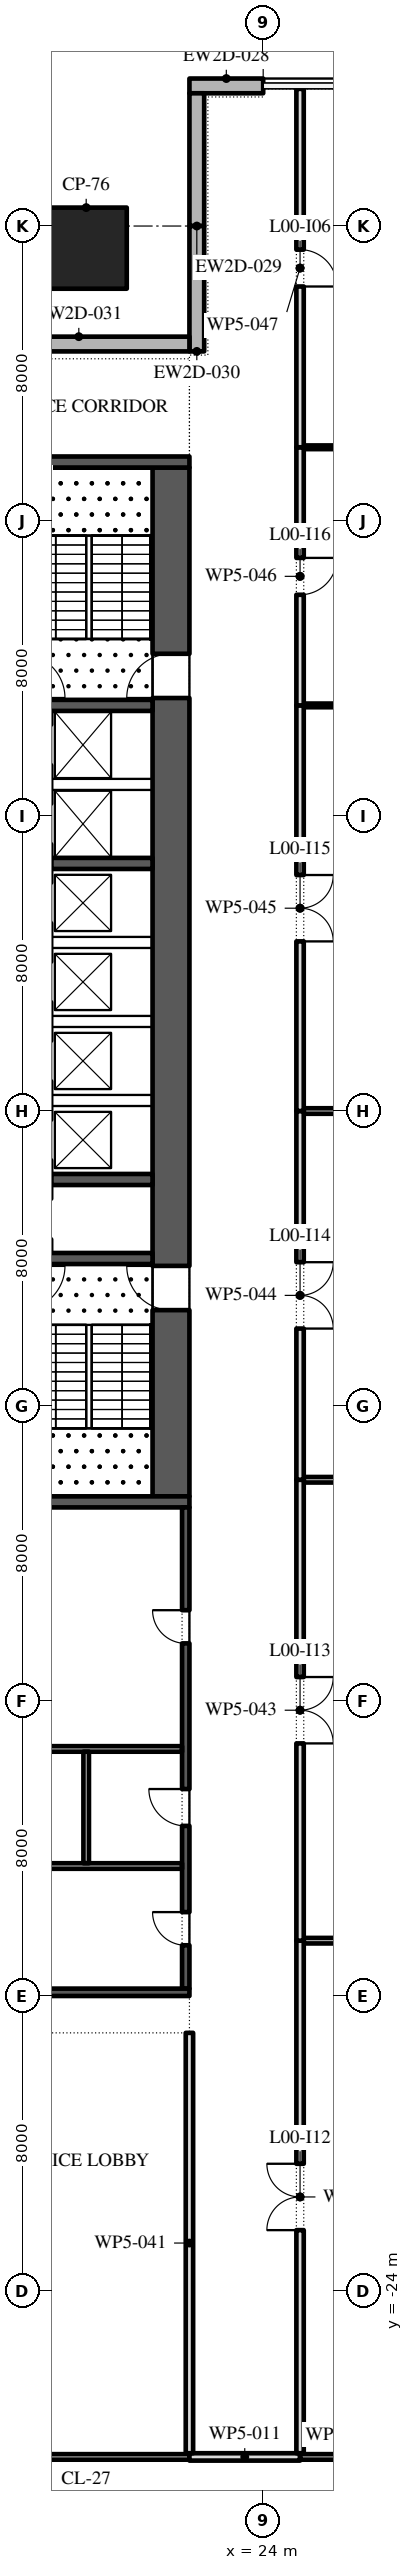
"""IFC4 building model, lengths in metres.
Left out: names, types, materials, properties, quantities, classifications, styles, units other than length and angle.
Written with IfcOpenShell. Run it as: python <this file> out.ifc"""

import sys

from ifc_helpers import new_model, si_unit, direction, frame, frame_2d, origin, origin_2d, place, context, subcontext, project, spatial, rectangle, extrude, element, fill, save


model = new_model("IFC4")
c1 = context("Model", 3, precision=1e-05, world=origin(), true_north=direction((0.0, 1.0)))
c2 = subcontext(c1, "Body", "Model", "MODEL_VIEW")
j1 = project(units=[si_unit("LENGTHUNIT", "METRE"), si_unit("PLANEANGLEUNIT", "RADIAN")], contexts=[c1])
p1 = place(None, origin())
s1 = spatial("IfcSite", under=j1, at=p1, CompositionType="ELEMENT")
p2 = place(p1, origin())
s2 = spatial("IfcBuilding", under=s1, at=p2, CompositionType="ELEMENT")
p3 = place(p2, origin())
s3 = spatial("IfcBuildingStorey", under=s2, at=p3, CompositionType="ELEMENT", Elevation=0.0)
p4 = place(p3, frame((19.2, 31.4, 0.0), z_axis=(0.0, 0.0, 1.0), x_axis=(1.0, 0.0, 0.0)))
e1 = element("IfcColumn", 1, at=p4, inside=s3, PredefinedType="COLUMN", context=c2, shape_type="SweptSolid", body=[
    extrude(rectangle(XDim=2.2, YDim=2.2, at=origin_2d()), origin(), (0.0, 0.0, 1.0), 8.0),
])
p5 = place(p3, frame((24.0, 35.8, 0.0), z_axis=(0.0, 0.0, 1.0), x_axis=(-1.0, 0.0, 0.0)))
e2 = element("IfcWall", 2, at=p5, inside=s3, PredefinedType="STANDARD", context=c2, shape_type="SweptSolid", body=[
    extrude(rectangle(XDim=2.0, YDim=0.4, at=frame_2d((1.0, 0.0))), origin(), (0.0, 0.0, 1.0), 7.7),
])
p6 = place(p3, frame((22.2, 35.6, 0.0), z_axis=(0.0, 0.0, 1.0), x_axis=(0.0, -1.0, 0.0)))
e3 = element("IfcWall", 3, at=p6, inside=s3, PredefinedType="STANDARD", context=c2, shape_type="SweptSolid", body=[
    extrude(rectangle(XDim=3.6, YDim=0.4, at=frame_2d((1.8, 0.0))), origin(), (0.0, 0.0, 1.0), 7.7),
])
p7 = place(p3, frame((22.2, 32.0, 0.0), z_axis=(0.0, 0.0, 1.0), x_axis=(0.0, -1.0, 0.0)))
e4 = element("IfcWall", 4, at=p7, inside=s3, PredefinedType="STANDARD", context=c2, shape_type="SweptSolid", body=[
    extrude(rectangle(XDim=3.4, YDim=0.4, at=frame_2d((1.7, 0.0))), origin(), (0.0, 0.0, 1.0), 7.7),
])
p8 = place(p3, frame((22.0, 28.8, 0.0), z_axis=(0.0, 0.0, 1.0), x_axis=(-1.0, 0.0, 0.0)))
e5 = element("IfcWall", 5, at=p8, inside=s3, PredefinedType="STANDARD", context=c2, shape_type="SweptSolid", body=[
    extrude(rectangle(XDim=6.0, YDim=0.4, at=frame_2d((3.0, 0.0))), origin(), (0.0, 0.0, 1.0), 7.7),
])
p9 = place(p3, frame((21.5, -2.45, 0.0), z_axis=(0.0, 0.0, 1.0), x_axis=(0.0, 1.0, 0.0)))
e6 = element("IfcWall", 6, at=p9, inside=s3, PredefinedType="SHEAR", context=c2, shape_type="SweptSolid", body=[
    extrude(rectangle(XDim=27.9, YDim=1.0, at=frame_2d((13.95, 0.0))), origin(), (0.0, 0.0, 1.0), 7.7),
])
p10 = place(p9, frame((5.05, 0.0, 0.0)))
e7 = element("IfcOpeningElement", 7, at=p10, cuts=e6, PredefinedType="OPENING", context=c2, shape_type="SweptSolid", body=[
    extrude(rectangle(XDim=1.2, YDim=2.1, at=frame_2d((0.6, 1.05))), frame((0.0, 0.51, 0.0), z_axis=(0.0, -1.0, 0.0), x_axis=(1.0, 0.0, 0.0)), (0.0, 0.0, 1.0), 1.02),
])
p11 = place(p9, frame((21.65, 0.0, 0.0)))
e8 = element("IfcOpeningElement", 8, at=p11, cuts=e6, PredefinedType="OPENING", context=c2, shape_type="SweptSolid", body=[
    extrude(rectangle(XDim=1.2, YDim=2.1, at=frame_2d((0.6, 1.05))), frame((0.0, 0.51, 0.0), z_axis=(0.0, -1.0, 0.0), x_axis=(1.0, 0.0, 0.0)), (0.0, 0.0, 1.0), 1.02),
])
for number, where, z_axis, x_axis in (
    (9, (10.0, -2.6, 0.0), (0.0, 0.0, 1.0), (1.0, 0.0, 0.0)),
    (10, (10.0, 25.6, 0.0), (0.0, 0.0, 1.0), (1.0, 0.0, 0.0)),
):
    element("IfcWall", number, at=place(p3, frame(where, z_axis=z_axis, x_axis=x_axis)), inside=s3, PredefinedType="SHEAR", context=c2, shape_type="SweptSolid", body=[
        extrude(rectangle(XDim=12.0, YDim=0.3, at=frame_2d((6.0, 0.0))), origin(), (0.0, 0.0, 1.0), 7.7),
    ])
for number, where, z_axis, x_axis in (
    (11, (17.3, 4.0, 0.0), (0.0, 0.0, 1.0), (1.0, 0.0, 0.0)),
    (12, (17.3, 19.0, 0.0), (0.0, 0.0, 1.0), (1.0, 0.0, 0.0)),
):
    element("IfcWall", number, at=place(p3, frame(where, z_axis=z_axis, x_axis=x_axis)), inside=s3, PredefinedType="SHEAR", context=c2, shape_type="SweptSolid", body=[
        extrude(rectangle(XDim=3.7, YDim=0.3, at=frame_2d((1.85, 0.0))), origin(), (0.0, 0.0, 1.0), 7.7),
    ])
for number, where, z_axis, x_axis in (
    (13, (18.25, 6.143, 0.0), (0.0, 0.0, 1.0), (1.0, 0.0, 0.0)),
    (14, (18.25, 14.714, 0.0), (0.0, 0.0, 1.0), (1.0, 0.0, 0.0)),
):
    element("IfcWall", number, at=place(p3, frame(where, z_axis=z_axis, x_axis=x_axis)), inside=s3, PredefinedType="SHEAR", context=c2, shape_type="SweptSolid", body=[
        extrude(rectangle(XDim=2.75, YDim=0.3, at=frame_2d((1.375, 0.0))), origin(), (0.0, 0.0, 1.0), 7.7),
    ])
p12 = place(p3, frame((21.9, -15.8, 0.0), z_axis=(0.0, 0.0, 1.0), x_axis=(0.0, 1.0, 0.0)))
e15 = element("IfcWall", 15, at=p12, inside=s3, PredefinedType="SHEAR", context=c2, shape_type="SweptSolid", body=[
    extrude(rectangle(XDim=13.05, YDim=0.2, at=frame_2d((6.525, 0.0))), origin(), (0.0, 0.0, 1.0), 7.7),
])
p13 = place(p12, frame((1.175, 0.0, 0.0)))
e16 = element("IfcOpeningElement", 16, at=p13, cuts=e15, PredefinedType="OPENING", context=c2, shape_type="SweptSolid", body=[
    extrude(rectangle(XDim=0.9, YDim=2.1, at=frame_2d((0.45, 1.05))), frame((0.0, 0.11, 0.0), z_axis=(0.0, -1.0, 0.0), x_axis=(1.0, 0.0, 0.0)), (0.0, 0.0, 1.0), 0.22),
])
p14 = place(p12, frame((4.413, 0.0, 0.0)))
e17 = element("IfcOpeningElement", 17, at=p14, cuts=e15, PredefinedType="OPENING", context=c2, shape_type="SweptSolid", body=[
    extrude(rectangle(XDim=1.0, YDim=2.1, at=frame_2d((0.5, 1.05))), frame((0.0, 0.11, 0.0), z_axis=(0.0, -1.0, 0.0), x_axis=(1.0, 0.0, 0.0)), (0.0, 0.0, 1.0), 0.22),
])
p15 = place(p12, frame((9.363, 0.0, 0.0)))
e18 = element("IfcOpeningElement", 18, at=p15, cuts=e15, PredefinedType="OPENING", context=c2, shape_type="SweptSolid", body=[
    extrude(rectangle(XDim=0.9, YDim=2.1, at=frame_2d((0.45, 1.05))), frame((0.0, 0.11, 0.0), z_axis=(0.0, -1.0, 0.0), x_axis=(1.0, 0.0, 0.0)), (0.0, 0.0, 1.0), 0.22),
])
p16 = place(p3, frame((10.0, -15.9, 0.0), z_axis=(0.0, 0.0, 1.0), x_axis=(1.0, 0.0, 0.0)))
e19 = element("IfcWall", 19, at=p16, inside=s3, PredefinedType="SHEAR", context=c2, shape_type="SweptSolid", body=[
    extrude(rectangle(XDim=12.0, YDim=0.2, at=frame_2d((6.0, 0.0))), origin(), (0.0, 0.0, 1.0), 7.7),
])
for number, where, z_axis, x_axis in (
    (20, (10.2, -9.3, 0.0), (0.0, 0.0, 1.0), (1.0, 0.0, 0.0)),
    (21, (10.2, -12.475, 0.0), (0.0, 0.0, 1.0), (1.0, 0.0, 0.0)),
):
    element("IfcWall", number, at=place(p3, frame(where, z_axis=z_axis, x_axis=x_axis)), inside=s3, PredefinedType="PARTITIONING", context=c2, shape_type="SweptSolid", body=[
        extrude(rectangle(XDim=11.6, YDim=0.15, at=frame_2d((5.8, 0.0))), origin(), (0.0, 0.0, 1.0), 7.7),
    ])
p17 = place(p3, frame((19.2, -12.4, 0.0), z_axis=(0.0, 0.0, 1.0), x_axis=(0.0, 1.0, 0.0)))
e22 = element("IfcWall", 22, at=p17, inside=s3, PredefinedType="PARTITIONING", context=c2, shape_type="SweptSolid", body=[
    extrude(rectangle(XDim=3.025, YDim=0.15, at=frame_2d((1.512, 0.0))), origin(), (0.0, 0.0, 1.0), 7.7),
])
p18 = place(p3, frame((10.4, -28.5, 0.0), z_axis=(0.0, 0.0, 1.0), x_axis=(1.0, 0.0, 0.0)))
e23 = element("IfcWall", 23, at=p18, inside=s3, PredefinedType="PARTITIONING", context=c2, shape_type="SweptSolid", body=[
    extrude(rectangle(XDim=11.6, YDim=0.15, at=frame_2d((5.8, 0.0))), origin(), (0.0, 0.0, 1.0), 7.7),
])
p19 = place(p18, frame((5.3, 0.0, 0.0)))
e24 = element("IfcOpeningElement", 24, at=p19, cuts=e23, PredefinedType="OPENING", context=c2, shape_type="SweptSolid", body=[
    extrude(rectangle(XDim=1.0, YDim=2.1, at=frame_2d((0.5, 1.05))), frame((0.0, 0.085, 0.0), z_axis=(0.0, -1.0, 0.0), x_axis=(1.0, 0.0, 0.0)), (0.0, 0.0, 1.0), 0.17),
])
p20 = place(p3, frame((22.0, -28.5, 0.0), z_axis=(0.0, 0.0, 1.0), x_axis=(1.0, 0.0, 0.0)))
e25 = element("IfcWall", 25, at=p20, inside=s3, PredefinedType="PARTITIONING", context=c2, shape_type="SweptSolid", body=[
    extrude(rectangle(XDim=3.0, YDim=0.2, at=frame_2d((1.5, 0.0))), origin(), (0.0, 0.0, 1.0), 7.7),
])
p21 = place(p3, frame((25.0, -28.5, 0.0), z_axis=(0.0, 0.0, 1.0), x_axis=(1.0, 0.0, 0.0)))
e26 = element("IfcWall", 26, at=p21, inside=s3, PredefinedType="PARTITIONING", context=c2, shape_type="SweptSolid", body=[
    extrude(rectangle(XDim=2.0, YDim=0.15, at=frame_2d((1.0, 0.0))), origin(), (0.0, 0.0, 1.0), 7.7),
])
p22 = place(p3, frame((25.1, -14.5, 0.0), z_axis=(0.0, 0.0, 1.0), x_axis=(1.0, 0.0, 0.0)))
e27 = element("IfcWall", 27, at=p22, inside=s3, PredefinedType="PARTITIONING", context=c2, shape_type="SweptSolid", body=[
    extrude(rectangle(XDim=18.62, YDim=0.15, at=frame_2d((9.31, 0.0))), origin(), (0.0, 0.0, 1.0), 7.7),
])
for number, where, z_axis, x_axis in (
    (28, (25.1, -2.0, 0.0), (0.0, 0.0, 1.0), (1.0, 0.0, 0.0)),
    (29, (25.1, 8.0, 0.0), (0.0, 0.0, 1.0), (1.0, 0.0, 0.0)),
):
    element("IfcWall", number, at=place(p3, frame(where, z_axis=z_axis, x_axis=x_axis)), inside=s3, PredefinedType="PARTITIONING", context=c2, shape_type="SweptSolid", body=[
        extrude(rectangle(XDim=18.4, YDim=0.15, at=frame_2d((9.2, 0.0))), origin(), (0.0, 0.0, 1.0), 7.7),
    ])
p23 = place(p3, frame((25.1, 19.0, 0.0), z_axis=(0.0, 0.0, 1.0), x_axis=(1.0, 0.0, 0.0)))
e30 = element("IfcWall", 30, at=p23, inside=s3, PredefinedType="PARTITIONING", context=c2, shape_type="SweptSolid", body=[
    extrude(rectangle(XDim=18.4, YDim=0.1, at=frame_2d((9.2, 0.0))), origin(), (0.0, 0.0, 1.0), 7.7),
])
p24 = place(p3, frame((25.1, 26.0, 0.0), z_axis=(0.0, 0.0, 1.0), x_axis=(1.0, 0.0, 0.0)))
e31 = element("IfcWall", 31, at=p24, inside=s3, PredefinedType="PARTITIONING", context=c2, shape_type="SweptSolid", body=[
    extrude(rectangle(XDim=8.9, YDim=0.1, at=frame_2d((4.45, 0.0))), origin(), (0.0, 0.0, 1.0), 7.7),
])
p25 = place(p3, frame((22.0, -28.4, 0.0), z_axis=(0.0, 0.0, 1.0), x_axis=(0.0, 1.0, 0.0)))
e32 = element("IfcWall", 32, at=p25, inside=s3, PredefinedType="PARTITIONING", context=c2, shape_type="SweptSolid", body=[
    extrude(rectangle(XDim=11.4, YDim=0.2, at=frame_2d((5.7, 0.0))), origin(), (0.0, 0.0, 1.0), 7.7),
])
p26 = place(p3, frame((25.0, -28.4, 0.0), z_axis=(0.0, 0.0, 1.0), x_axis=(0.0, 1.0, 0.0)))
e33 = element("IfcWall", 33, at=p26, inside=s3, PredefinedType="PARTITIONING", context=c2, shape_type="SweptSolid", body=[
    extrude(rectangle(XDim=13.9, YDim=0.2, at=frame_2d((6.95, 0.0))), origin(), (0.0, 0.0, 1.0), 7.7),
])
p27 = place(p26, frame((6.05, 0.0, 0.0)))
e34 = element("IfcOpeningElement", 34, at=p27, cuts=e33, PredefinedType="OPENING", context=c2, shape_type="SweptSolid", body=[
    extrude(rectangle(XDim=1.8, YDim=2.1, at=frame_2d((0.9, 1.05))), frame((0.0, 0.11, 0.0), z_axis=(0.0, -1.0, 0.0), x_axis=(1.0, 0.0, 0.0)), (0.0, 0.0, 1.0), 0.22),
])
p28 = place(p3, frame((25.0, -14.5, 0.0), z_axis=(0.0, 0.0, 1.0), x_axis=(0.0, 1.0, 0.0)))
e35 = element("IfcWall", 35, at=p28, inside=s3, PredefinedType="PARTITIONING", context=c2, shape_type="SweptSolid", body=[
    extrude(rectangle(XDim=12.5, YDim=0.2, at=frame_2d((6.25, 0.0))), origin(), (0.0, 0.0, 1.0), 7.7),
])
p29 = place(p28, frame((5.35, 0.0, 0.0)))
e36 = element("IfcOpeningElement", 36, at=p29, cuts=e35, PredefinedType="OPENING", context=c2, shape_type="SweptSolid", body=[
    extrude(rectangle(XDim=1.8, YDim=2.1, at=frame_2d((0.9, 1.05))), frame((0.0, 0.11, 0.0), z_axis=(0.0, -1.0, 0.0), x_axis=(1.0, 0.0, 0.0)), (0.0, 0.0, 1.0), 0.22),
])
p30 = place(p3, frame((25.0, -2.0, 0.0), z_axis=(0.0, 0.0, 1.0), x_axis=(0.0, 1.0, 0.0)))
e37 = element("IfcWall", 37, at=p30, inside=s3, PredefinedType="PARTITIONING", context=c2, shape_type="SweptSolid", body=[
    extrude(rectangle(XDim=10.0, YDim=0.2, at=frame_2d((5.0, 0.0))), origin(), (0.0, 0.0, 1.0), 7.7),
])
p31 = place(p30, frame((4.1, 0.0, 0.0)))
e38 = element("IfcOpeningElement", 38, at=p31, cuts=e37, PredefinedType="OPENING", context=c2, shape_type="SweptSolid", body=[
    extrude(rectangle(XDim=1.8, YDim=2.1, at=frame_2d((0.9, 1.05))), frame((0.0, 0.11, 0.0), z_axis=(0.0, -1.0, 0.0), x_axis=(1.0, 0.0, 0.0)), (0.0, 0.0, 1.0), 0.22),
])
p32 = place(p3, frame((25.0, 8.0, 0.0), z_axis=(0.0, 0.0, 1.0), x_axis=(0.0, 1.0, 0.0)))
e39 = element("IfcWall", 39, at=p32, inside=s3, PredefinedType="PARTITIONING", context=c2, shape_type="SweptSolid", body=[
    extrude(rectangle(XDim=11.0, YDim=0.2, at=frame_2d((5.5, 0.0))), origin(), (0.0, 0.0, 1.0), 7.7),
])
p33 = place(p32, frame((4.6, 0.0, 0.0)))
e40 = element("IfcOpeningElement", 40, at=p33, cuts=e39, PredefinedType="OPENING", context=c2, shape_type="SweptSolid", body=[
    extrude(rectangle(XDim=1.8, YDim=2.1, at=frame_2d((0.9, 1.05))), frame((0.0, 0.11, 0.0), z_axis=(0.0, -1.0, 0.0), x_axis=(1.0, 0.0, 0.0)), (0.0, 0.0, 1.0), 0.22),
])
p34 = place(p3, frame((25.0, 19.0, 0.0), z_axis=(0.0, 0.0, 1.0), x_axis=(0.0, 1.0, 0.0)))
e41 = element("IfcWall", 41, at=p34, inside=s3, PredefinedType="PARTITIONING", context=c2, shape_type="SweptSolid", body=[
    extrude(rectangle(XDim=7.0, YDim=0.2, at=frame_2d((3.5, 0.0))), origin(), (0.0, 0.0, 1.0), 7.7),
])
p35 = place(p34, frame((3.0, 0.0, 0.0)))
e42 = element("IfcOpeningElement", 42, at=p35, cuts=e41, PredefinedType="OPENING", context=c2, shape_type="SweptSolid", body=[
    extrude(rectangle(XDim=1.0, YDim=2.1, at=frame_2d((0.5, 1.05))), frame((0.0, 0.11, 0.0), z_axis=(0.0, -1.0, 0.0), x_axis=(1.0, 0.0, 0.0)), (0.0, 0.0, 1.0), 0.22),
])
p36 = place(p3, frame((25.0, 26.0, 0.0), z_axis=(0.0, 0.0, 1.0), x_axis=(0.0, 1.0, 0.0)))
e43 = element("IfcWall", 43, at=p36, inside=s3, PredefinedType="PARTITIONING", context=c2, shape_type="SweptSolid", body=[
    extrude(rectangle(XDim=9.72, YDim=0.2, at=frame_2d((4.86, 0.0))), origin(), (0.0, 0.0, 1.0), 7.7),
])
p37 = place(p36, frame((4.36, 0.0, 0.0)))
e44 = element("IfcOpeningElement", 44, at=p37, cuts=e43, PredefinedType="OPENING", context=c2, shape_type="SweptSolid", body=[
    extrude(rectangle(XDim=1.0, YDim=2.1, at=frame_2d((0.5, 1.05))), frame((0.0, 0.11, 0.0), z_axis=(0.0, -1.0, 0.0), x_axis=(1.0, 0.0, 0.0)), (0.0, 0.0, 1.0), 0.22),
])
p38 = place(p10, origin())
e45 = element("IfcDoor", 45, at=p38, inside=s3, OperationType="SINGLE_SWING_LEFT", PredefinedType="DOOR", context=c2, shape_type="SweptSolid", body=[
    extrude(rectangle(XDim=1.2, YDim=2.1, at=frame_2d((0.6, 1.05))), frame((0.0, 0.025, 0.0), z_axis=(0.0, -1.0, 0.0), x_axis=(1.0, 0.0, 0.0)), (0.0, 0.0, 1.0), 0.05),
])
fill(e7, e45)
p39 = place(p11, origin())
e46 = element("IfcDoor", 46, at=p39, inside=s3, OperationType="SINGLE_SWING_RIGHT", PredefinedType="DOOR", context=c2, shape_type="SweptSolid", body=[
    extrude(rectangle(XDim=1.2, YDim=2.1, at=frame_2d((0.6, 1.05))), frame((0.0, 0.025, 0.0), z_axis=(0.0, -1.0, 0.0), x_axis=(1.0, 0.0, 0.0)), (0.0, 0.0, 1.0), 0.05),
])
fill(e8, e46)
p40 = place(p13, origin())
e47 = element("IfcDoor", 47, at=p40, inside=s3, OperationType="SINGLE_SWING_LEFT", PredefinedType="DOOR", context=c2, shape_type="SweptSolid", body=[
    extrude(rectangle(XDim=0.9, YDim=2.1, at=frame_2d((0.45, 1.05))), frame((0.0, 0.1, 0.0), z_axis=(0.0, -1.0, 0.0), x_axis=(1.0, 0.0, 0.0)), (0.0, 0.0, 1.0), 0.05),
])
fill(e16, e47)
p41 = place(p14, origin())
e48 = element("IfcDoor", 48, at=p41, inside=s3, OperationType="SINGLE_SWING_LEFT", PredefinedType="DOOR", context=c2, shape_type="SweptSolid", body=[
    extrude(rectangle(XDim=1.0, YDim=2.1, at=frame_2d((0.5, 1.05))), frame((0.0, 0.1, 0.0), z_axis=(0.0, -1.0, 0.0), x_axis=(1.0, 0.0, 0.0)), (0.0, 0.0, 1.0), 0.05),
])
fill(e17, e48)
p42 = place(p15, origin())
e49 = element("IfcDoor", 49, at=p42, inside=s3, OperationType="SINGLE_SWING_LEFT", PredefinedType="DOOR", context=c2, shape_type="SweptSolid", body=[
    extrude(rectangle(XDim=0.9, YDim=2.1, at=frame_2d((0.45, 1.05))), frame((0.0, 0.1, 0.0), z_axis=(0.0, -1.0, 0.0), x_axis=(1.0, 0.0, 0.0)), (0.0, 0.0, 1.0), 0.05),
])
fill(e18, e49)
p43 = place(p37, frame((1.0, 0.0, 0.0), z_axis=(0.0, 0.0, 1.0), x_axis=(-1.0, 0.0, 0.0)))
e50 = element("IfcDoor", 50, at=p43, inside=s3, OperationType="SINGLE_SWING_LEFT", PredefinedType="DOOR", context=c2, shape_type="SweptSolid", body=[
    extrude(rectangle(XDim=1.0, YDim=2.1, at=frame_2d((0.5, 1.05))), frame((0.0, 0.025, 0.0), z_axis=(0.0, -1.0, 0.0), x_axis=(1.0, 0.0, 0.0)), (0.0, 0.0, 1.0), 0.05),
])
fill(e44, e50)
p44 = place(p27, origin())
e51 = element("IfcDoor", 51, at=p44, inside=s3, OperationType="SINGLE_SWING_RIGHT", PredefinedType="DOOR", context=c2, shape_type="SweptSolid", body=[
    extrude(rectangle(XDim=1.8, YDim=2.1, at=frame_2d((0.9, 1.05))), frame((0.0, 0.025, 0.0), z_axis=(0.0, -1.0, 0.0), x_axis=(1.0, 0.0, 0.0)), (0.0, 0.0, 1.0), 0.05),
])
fill(e34, e51)
p45 = place(p29, frame((1.8, 0.0, 0.0), z_axis=(0.0, 0.0, 1.0), x_axis=(-1.0, 0.0, 0.0)))
e52 = element("IfcDoor", 52, at=p45, inside=s3, OperationType="SINGLE_SWING_LEFT", PredefinedType="DOOR", context=c2, shape_type="SweptSolid", body=[
    extrude(rectangle(XDim=1.8, YDim=2.1, at=frame_2d((0.9, 1.05))), frame((0.0, 0.025, 0.0), z_axis=(0.0, -1.0, 0.0), x_axis=(1.0, 0.0, 0.0)), (0.0, 0.0, 1.0), 0.05),
])
fill(e36, e52)
p46 = place(p31, frame((1.8, 0.0, 0.0), z_axis=(0.0, 0.0, 1.0), x_axis=(-1.0, 0.0, 0.0)))
e53 = element("IfcDoor", 53, at=p46, inside=s3, OperationType="SINGLE_SWING_RIGHT", PredefinedType="DOOR", context=c2, shape_type="SweptSolid", body=[
    extrude(rectangle(XDim=1.8, YDim=2.1, at=frame_2d((0.9, 1.05))), frame((0.0, 0.025, 0.0), z_axis=(0.0, -1.0, 0.0), x_axis=(1.0, 0.0, 0.0)), (0.0, 0.0, 1.0), 0.05),
])
fill(e38, e53)
p47 = place(p33, frame((1.8, 0.0, 0.0), z_axis=(0.0, 0.0, 1.0), x_axis=(-1.0, 0.0, 0.0)))
e54 = element("IfcDoor", 54, at=p47, inside=s3, OperationType="SINGLE_SWING_RIGHT", PredefinedType="DOOR", context=c2, shape_type="SweptSolid", body=[
    extrude(rectangle(XDim=1.8, YDim=2.1, at=frame_2d((0.9, 1.05))), frame((0.0, 0.025, 0.0), z_axis=(0.0, -1.0, 0.0), x_axis=(1.0, 0.0, 0.0)), (0.0, 0.0, 1.0), 0.05),
])
fill(e40, e54)
p48 = place(p35, frame((1.0, 0.0, 0.0), z_axis=(0.0, 0.0, 1.0), x_axis=(-1.0, 0.0, 0.0)))
e55 = element("IfcDoor", 55, at=p48, inside=s3, OperationType="SINGLE_SWING_RIGHT", PredefinedType="DOOR", context=c2, shape_type="SweptSolid", body=[
    extrude(rectangle(XDim=1.0, YDim=2.1, at=frame_2d((0.5, 1.05))), frame((0.0, 0.025, 0.0), z_axis=(0.0, -1.0, 0.0), x_axis=(1.0, 0.0, 0.0)), (0.0, 0.0, 1.0), 0.05),
])
fill(e42, e55)
save(model, sys.argv[1])
